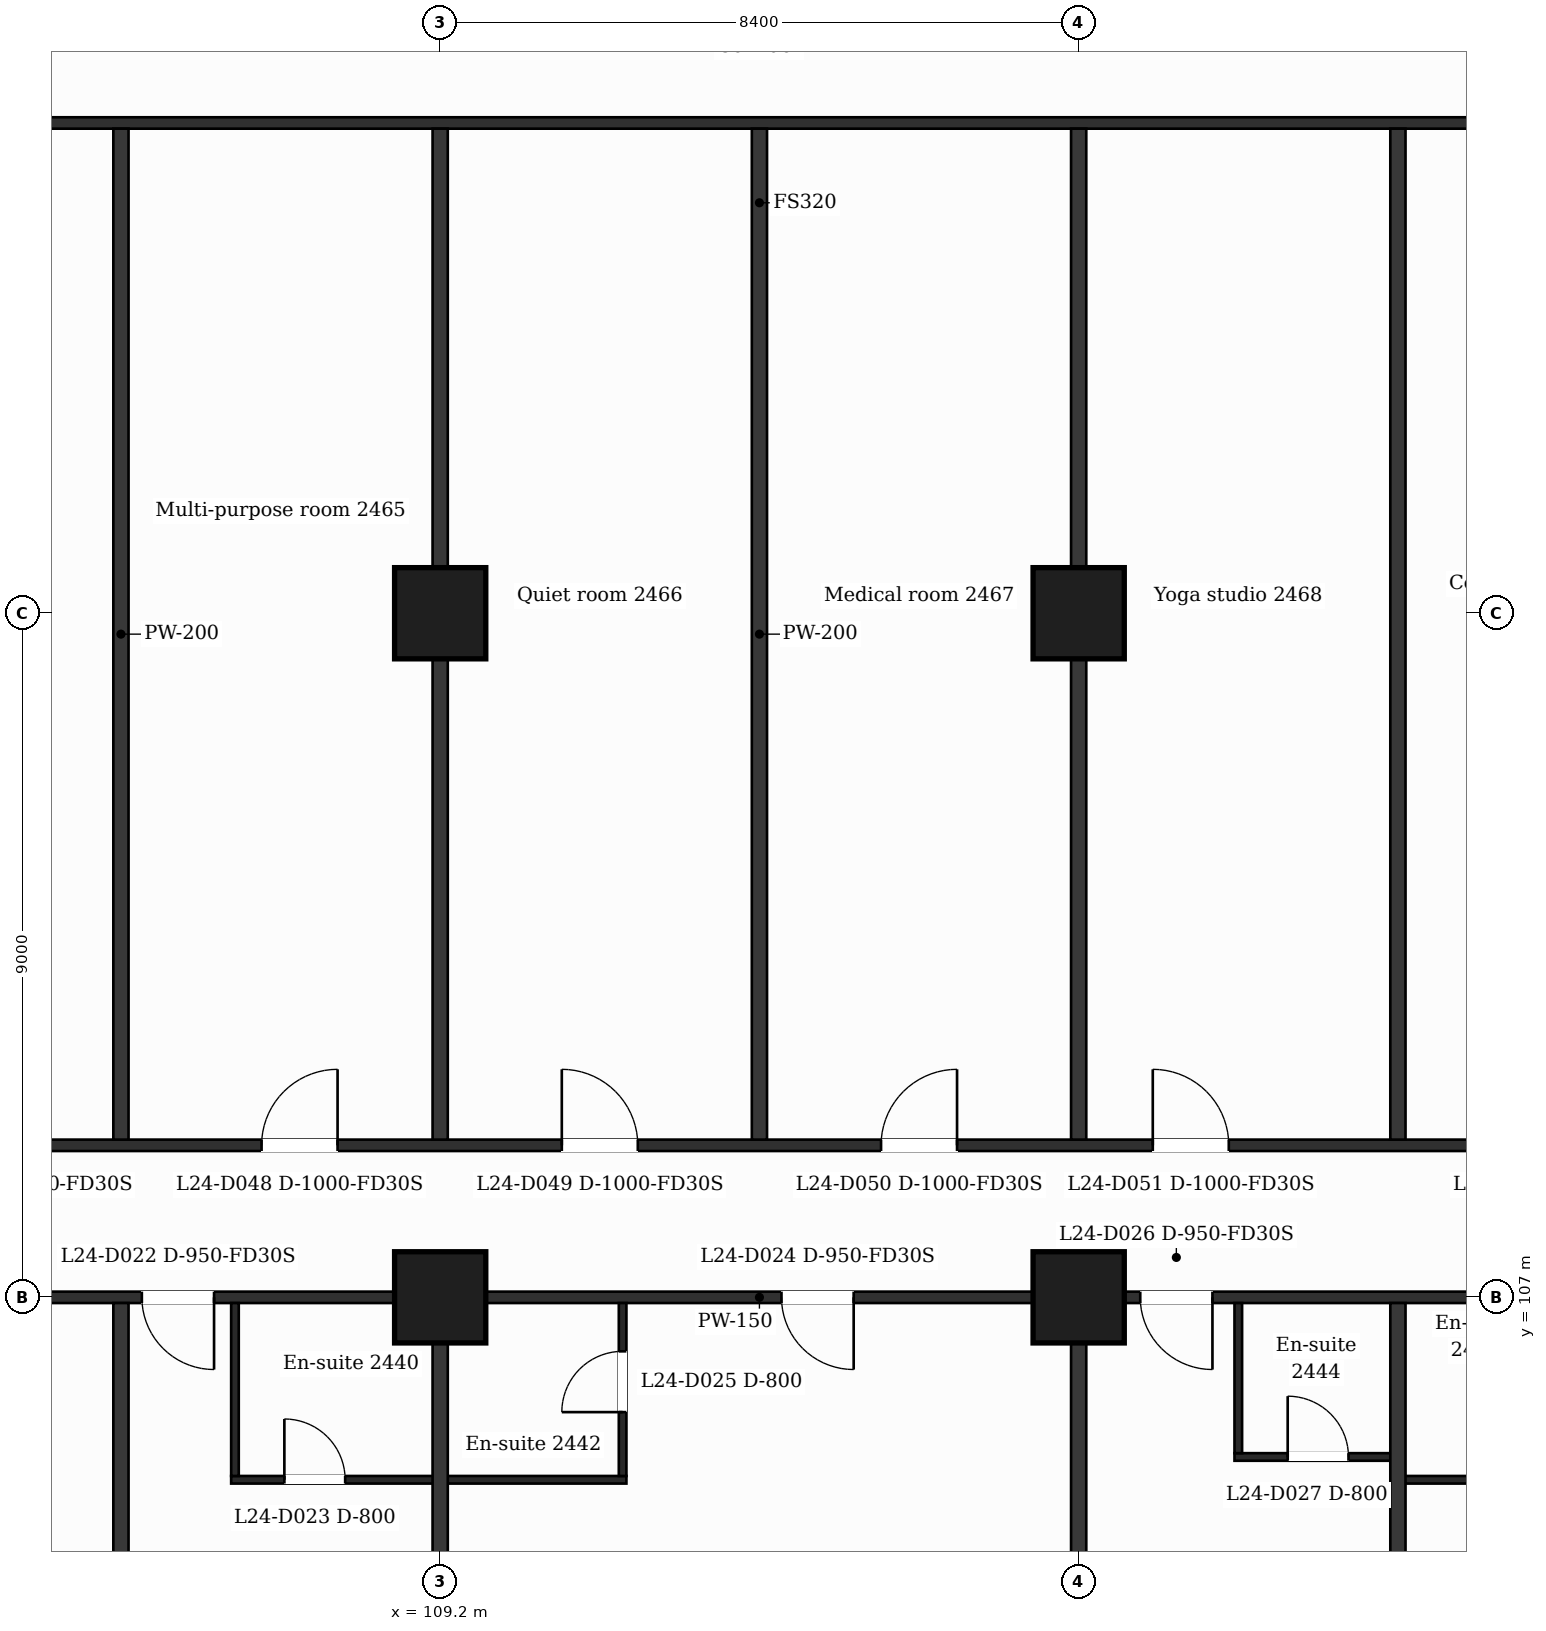
"""IFC4 building model, lengths in metres.
Left out: names, types, materials, properties, quantities, classifications, styles, units other than length and angle.
Written with IfcOpenShell. Run it as: python <this file> out.ifc"""

import sys

from ifc_helpers import new_model, si_unit, direction, frame, frame_2d, origin, origin_2d, place, context, subcontext, project, spatial, rectangle, extrude, element, fill, save


model = new_model("IFC4")
c1 = context("Model", 3, precision=1e-05, world=origin(), true_north=direction((0.0, 1.0)))
c2 = subcontext(c1, "Body", "Model", "MODEL_VIEW")
j1 = project(units=[si_unit("LENGTHUNIT", "METRE"), si_unit("PLANEANGLEUNIT", "RADIAN")], contexts=[c1])
p1 = place(None, origin())
s1 = spatial("IfcSite", under=j1, at=p1, CompositionType="ELEMENT")
p2 = place(p1, origin())
s2 = spatial("IfcBuilding", under=s1, at=p2, CompositionType="ELEMENT")
p3 = place(p2, frame((0.0, 0.0, 105.8)))
s3 = spatial("IfcBuildingStorey", under=s2, at=p3, CompositionType="ELEMENT", Elevation=105.8)
for number, where, z_axis, x_axis in (
    (1, (109.2, 107.0, 0.0), (0.0, 0.0, 1.0), (1.0, 0.0, 0.0)),
    (2, (117.6, 107.0, 0.0), (0.0, 0.0, 1.0), (1.0, 0.0, 0.0)),
    (3, (109.2, 116.0, 0.0), (0.0, 0.0, 1.0), (1.0, 0.0, 0.0)),
    (4, (117.6, 116.0, 0.0), (0.0, 0.0, 1.0), (1.0, 0.0, 0.0)),
):
    element("IfcColumn", number, at=place(p3, frame(where, z_axis=z_axis, x_axis=x_axis)), inside=s3, PredefinedType="COLUMN", context=c2, shape_type="SweptSolid", body=[
        extrude(rectangle(XDim=1.2, YDim=1.2, at=origin_2d()), origin(), (0.0, 0.0, 1.0), 3.7),
    ])
p4 = place(p3, frame((106.45, 104.6, 0.0), z_axis=(0.0, 0.0, 1.0), x_axis=(1.0, 0.0, 0.0)))
e5 = element("IfcWall", 5, at=p4, inside=s3, PredefinedType="PARTITIONING", context=c2, shape_type="SweptSolid", body=[
    extrude(rectangle(XDim=5.2, YDim=0.1, at=frame_2d((2.6, 0.0))), origin(), (0.0, 0.0, 1.0), 3.38),
])
p5 = place(p4, frame((0.7, 0.0, 0.0)))
e6 = element("IfcOpeningElement", 6, at=p5, cuts=e5, PredefinedType="OPENING", context=c2, shape_type="SweptSolid", body=[
    extrude(rectangle(XDim=0.8, YDim=2.1, at=frame_2d((0.4, 1.05))), frame((0.0, 0.06, 0.0), z_axis=(0.0, -1.0, 0.0), x_axis=(1.0, 0.0, 0.0)), (0.0, 0.0, 1.0), 0.12),
])
p6 = place(p3, frame((121.8, 104.6, 0.0), z_axis=(0.0, 0.0, 1.0), x_axis=(1.0, 0.0, 0.0)))
e7 = element("IfcWall", 7, at=p6, inside=s3, PredefinedType="PARTITIONING", context=c2, shape_type="SweptSolid", body=[
    extrude(rectangle(XDim=1.85, YDim=0.1, at=frame_2d((0.925, 0.0))), origin(), (0.0, 0.0, 1.0), 3.38),
])
p7 = place(p3, frame((119.65, 104.9, 0.0), z_axis=(0.0, 0.0, 1.0), x_axis=(1.0, 0.0, 0.0)))
e8 = element("IfcWall", 8, at=p7, inside=s3, PredefinedType="PARTITIONING", context=c2, shape_type="SweptSolid", body=[
    extrude(rectangle(XDim=2.15, YDim=0.1, at=frame_2d((1.075, 0.0))), origin(), (0.0, 0.0, 1.0), 3.38),
])
p8 = place(p7, frame((0.7, 0.0, 0.0)))
e9 = element("IfcOpeningElement", 9, at=p8, cuts=e8, PredefinedType="OPENING", context=c2, shape_type="SweptSolid", body=[
    extrude(rectangle(XDim=0.8, YDim=2.1, at=frame_2d((0.4, 1.05))), frame((0.0, 0.06, 0.0), z_axis=(0.0, -1.0, 0.0), x_axis=(1.0, 0.0, 0.0)), (0.0, 0.0, 1.0), 0.12),
])
p9 = place(p3, frame((87.018, 107.0, 0.0), z_axis=(0.0, 0.0, 1.0), x_axis=(1.0, 0.0, 0.0)))
e10 = element("IfcWall", 10, at=p9, inside=s3, PredefinedType="PARTITIONING", context=c2, shape_type="SweptSolid", body=[
    extrude(rectangle(XDim=52.765, YDim=0.15, at=frame_2d((26.382, 0.0))), origin(), (0.0, 0.0, 1.0), 3.38),
])
p10 = place(p9, frame((1.276, 0.0, 0.0)))
e11 = element("IfcOpeningElement", 11, at=p10, cuts=e10, PredefinedType="OPENING", context=c2, shape_type="SweptSolid", body=[
    extrude(rectangle(XDim=0.95, YDim=2.1, at=frame_2d((0.475, 1.05))), frame((0.0, 0.085, 0.0), z_axis=(0.0, -1.0, 0.0), x_axis=(1.0, 0.0, 0.0)), (0.0, 0.0, 1.0), 0.17),
])
p11 = place(p9, frame((6.152, 0.0, 0.0)))
e12 = element("IfcOpeningElement", 12, at=p11, cuts=e10, PredefinedType="OPENING", context=c2, shape_type="SweptSolid", body=[
    extrude(rectangle(XDim=0.95, YDim=2.1, at=frame_2d((0.475, 1.05))), frame((0.0, 0.085, 0.0), z_axis=(0.0, -1.0, 0.0), x_axis=(1.0, 0.0, 0.0)), (0.0, 0.0, 1.0), 0.17),
])
p12 = place(p9, frame((14.59, 0.0, 0.0)))
e13 = element("IfcOpeningElement", 13, at=p12, cuts=e10, PredefinedType="OPENING", context=c2, shape_type="SweptSolid", body=[
    extrude(rectangle(XDim=0.95, YDim=2.1, at=frame_2d((0.475, 1.05))), frame((0.0, 0.085, 0.0), z_axis=(0.0, -1.0, 0.0), x_axis=(1.0, 0.0, 0.0)), (0.0, 0.0, 1.0), 0.17),
])
p13 = place(p9, frame((18.257, 0.0, 0.0)))
e14 = element("IfcOpeningElement", 14, at=p13, cuts=e10, PredefinedType="OPENING", context=c2, shape_type="SweptSolid", body=[
    extrude(rectangle(XDim=0.95, YDim=2.1, at=frame_2d((0.475, 1.05))), frame((0.0, 0.085, 0.0), z_axis=(0.0, -1.0, 0.0), x_axis=(1.0, 0.0, 0.0)), (0.0, 0.0, 1.0), 0.17),
])
p14 = place(p9, frame((26.672, 0.0, 0.0)))
e15 = element("IfcOpeningElement", 15, at=p14, cuts=e10, PredefinedType="OPENING", context=c2, shape_type="SweptSolid", body=[
    extrude(rectangle(XDim=0.95, YDim=2.1, at=frame_2d((0.475, 1.05))), frame((0.0, 0.085, 0.0), z_axis=(0.0, -1.0, 0.0), x_axis=(1.0, 0.0, 0.0)), (0.0, 0.0, 1.0), 0.17),
])
p15 = place(p9, frame((31.392, 0.0, 0.0)))
e16 = element("IfcOpeningElement", 16, at=p15, cuts=e10, PredefinedType="OPENING", context=c2, shape_type="SweptSolid", body=[
    extrude(rectangle(XDim=0.95, YDim=2.1, at=frame_2d((0.475, 1.05))), frame((0.0, 0.085, 0.0), z_axis=(0.0, -1.0, 0.0), x_axis=(1.0, 0.0, 0.0)), (0.0, 0.0, 1.0), 0.17),
])
p16 = place(p9, frame((37.182, 0.0, 0.0)))
e17 = element("IfcOpeningElement", 17, at=p16, cuts=e10, PredefinedType="OPENING", context=c2, shape_type="SweptSolid", body=[
    extrude(rectangle(XDim=0.95, YDim=2.1, at=frame_2d((0.475, 1.05))), frame((0.0, 0.085, 0.0), z_axis=(0.0, -1.0, 0.0), x_axis=(1.0, 0.0, 0.0)), (0.0, 0.0, 1.0), 0.17),
])
p17 = place(p9, frame((41.762, 0.0, 0.0)))
e18 = element("IfcOpeningElement", 18, at=p17, cuts=e10, PredefinedType="OPENING", context=c2, shape_type="SweptSolid", body=[
    extrude(rectangle(XDim=0.95, YDim=2.1, at=frame_2d((0.475, 1.05))), frame((0.0, 0.085, 0.0), z_axis=(0.0, -1.0, 0.0), x_axis=(1.0, 0.0, 0.0)), (0.0, 0.0, 1.0), 0.17),
])
p18 = place(p9, frame((49.285, 0.0, 0.0)))
e19 = element("IfcOpeningElement", 19, at=p18, cuts=e10, PredefinedType="OPENING", context=c2, shape_type="SweptSolid", body=[
    extrude(rectangle(XDim=0.95, YDim=2.1, at=frame_2d((0.475, 1.05))), frame((0.0, 0.085, 0.0), z_axis=(0.0, -1.0, 0.0), x_axis=(1.0, 0.0, 0.0)), (0.0, 0.0, 1.0), 0.17),
])
p19 = place(p3, frame((100.725, 109.0, 0.0), z_axis=(0.0, 0.0, 1.0), x_axis=(1.0, 0.0, 0.0)))
e20 = element("IfcWall", 20, at=p19, inside=s3, PredefinedType="PARTITIONING", context=c2, shape_type="SweptSolid", body=[
    extrude(rectangle(XDim=25.35, YDim=0.15, at=frame_2d((12.675, 0.0))), origin(), (0.0, 0.0, 1.0), 3.38),
])
p20 = place(p19, frame((2.3, 0.0, 0.0)))
e21 = element("IfcOpeningElement", 21, at=p20, cuts=e20, PredefinedType="OPENING", context=c2, shape_type="SweptSolid", body=[
    extrude(rectangle(XDim=1.0, YDim=2.1, at=frame_2d((0.5, 1.05))), frame((0.0, 0.085, 0.0), z_axis=(0.0, -1.0, 0.0), x_axis=(1.0, 0.0, 0.0)), (0.0, 0.0, 1.0), 0.17),
])
p21 = place(p19, frame((6.125, 0.0, 0.0)))
e22 = element("IfcOpeningElement", 22, at=p21, cuts=e20, PredefinedType="OPENING", context=c2, shape_type="SweptSolid", body=[
    extrude(rectangle(XDim=1.0, YDim=2.1, at=frame_2d((0.5, 1.05))), frame((0.0, 0.085, 0.0), z_axis=(0.0, -1.0, 0.0), x_axis=(1.0, 0.0, 0.0)), (0.0, 0.0, 1.0), 0.17),
])
p22 = place(p19, frame((10.075, 0.0, 0.0)))
e23 = element("IfcOpeningElement", 23, at=p22, cuts=e20, PredefinedType="OPENING", context=c2, shape_type="SweptSolid", body=[
    extrude(rectangle(XDim=1.0, YDim=2.1, at=frame_2d((0.5, 1.05))), frame((0.0, 0.085, 0.0), z_axis=(0.0, -1.0, 0.0), x_axis=(1.0, 0.0, 0.0)), (0.0, 0.0, 1.0), 0.17),
])
p23 = place(p19, frame((14.275, 0.0, 0.0)))
e24 = element("IfcOpeningElement", 24, at=p23, cuts=e20, PredefinedType="OPENING", context=c2, shape_type="SweptSolid", body=[
    extrude(rectangle(XDim=1.0, YDim=2.1, at=frame_2d((0.5, 1.05))), frame((0.0, 0.085, 0.0), z_axis=(0.0, -1.0, 0.0), x_axis=(1.0, 0.0, 0.0)), (0.0, 0.0, 1.0), 0.17),
])
p24 = place(p19, frame((17.85, 0.0, 0.0)))
e25 = element("IfcOpeningElement", 25, at=p24, cuts=e20, PredefinedType="OPENING", context=c2, shape_type="SweptSolid", body=[
    extrude(rectangle(XDim=1.0, YDim=2.1, at=frame_2d((0.5, 1.05))), frame((0.0, 0.085, 0.0), z_axis=(0.0, -1.0, 0.0), x_axis=(1.0, 0.0, 0.0)), (0.0, 0.0, 1.0), 0.17),
])
p25 = place(p19, frame((22.925, 0.0, 0.0)))
e26 = element("IfcOpeningElement", 26, at=p25, cuts=e20, PredefinedType="OPENING", context=c2, shape_type="SweptSolid", body=[
    extrude(rectangle(XDim=1.0, YDim=2.1, at=frame_2d((0.5, 1.05))), frame((0.0, 0.085, 0.0), z_axis=(0.0, -1.0, 0.0), x_axis=(1.0, 0.0, 0.0)), (0.0, 0.0, 1.0), 0.17),
])
p26 = place(p3, frame((100.8, 122.45, 0.0), z_axis=(0.0, 0.0, 1.0), x_axis=(1.0, 0.0, 0.0)))
e27 = element("IfcWall", 27, at=p26, inside=s3, PredefinedType="PARTITIONING", context=c2, shape_type="SweptSolid", body=[
    extrude(rectangle(XDim=25.2, YDim=0.15, at=frame_2d((12.6, 0.0))), origin(), (0.0, 0.0, 1.0), 3.38),
])
p27 = place(p3, frame((105.0, 99.79, 0.0), z_axis=(0.0, 0.0, 1.0), x_axis=(0.0, 1.0, 0.0)))
e28 = element("IfcWall", 28, at=p27, inside=s3, PredefinedType="PARTITIONING", context=c2, shape_type="SweptSolid", body=[
    extrude(rectangle(XDim=7.135, YDim=0.2, at=frame_2d((3.567, 0.0))), origin(), (0.0, 0.0, 1.0), 3.38),
])
p28 = place(p3, frame((105.0, 109.075, 0.0), z_axis=(0.0, 0.0, 1.0), x_axis=(0.0, 1.0, 0.0)))
e29 = element("IfcWall", 29, at=p28, inside=s3, PredefinedType="PARTITIONING", context=c2, shape_type="SweptSolid", body=[
    extrude(rectangle(XDim=13.3, YDim=0.2, at=frame_2d((6.65, 0.0))), origin(), (0.0, 0.0, 1.0), 3.38),
])
p29 = place(p3, frame((106.5, 104.65, 0.0), z_axis=(0.0, 0.0, 1.0), x_axis=(0.0, 1.0, 0.0)))
e30 = element("IfcWall", 30, at=p29, inside=s3, PredefinedType="PARTITIONING", context=c2, shape_type="SweptSolid", body=[
    extrude(rectangle(XDim=2.275, YDim=0.1, at=frame_2d((1.138, 0.0))), origin(), (0.0, 0.0, 1.0), 3.38),
])
p30 = place(p3, frame((109.2, 99.79, 0.0), z_axis=(0.0, 0.0, 1.0), x_axis=(0.0, 1.0, 0.0)))
e31 = element("IfcWall", 31, at=p30, inside=s3, PredefinedType="PARTITIONING", context=c2, shape_type="SweptSolid", body=[
    extrude(rectangle(XDim=7.135, YDim=0.2, at=frame_2d((3.567, 0.0))), origin(), (0.0, 0.0, 1.0), 3.38),
])
p31 = place(p3, frame((109.2, 109.075, 0.0), z_axis=(0.0, 0.0, 1.0), x_axis=(0.0, 1.0, 0.0)))
e32 = element("IfcWall", 32, at=p31, inside=s3, PredefinedType="PARTITIONING", context=c2, shape_type="SweptSolid", body=[
    extrude(rectangle(XDim=13.3, YDim=0.2, at=frame_2d((6.65, 0.0))), origin(), (0.0, 0.0, 1.0), 3.38),
])
p32 = place(p3, frame((111.6, 104.65, 0.0), z_axis=(0.0, 0.0, 1.0), x_axis=(0.0, 1.0, 0.0)))
e33 = element("IfcWall", 33, at=p32, inside=s3, PredefinedType="PARTITIONING", context=c2, shape_type="SweptSolid", body=[
    extrude(rectangle(XDim=2.275, YDim=0.1, at=frame_2d((1.138, 0.0))), origin(), (0.0, 0.0, 1.0), 3.38),
])
p33 = place(p32, frame((0.84, 0.0, 0.0)))
e34 = element("IfcOpeningElement", 34, at=p33, cuts=e33, PredefinedType="OPENING", context=c2, shape_type="SweptSolid", body=[
    extrude(rectangle(XDim=0.8, YDim=2.1, at=frame_2d((0.4, 1.05))), frame((0.0, 0.06, 0.0), z_axis=(0.0, -1.0, 0.0), x_axis=(1.0, 0.0, 0.0)), (0.0, 0.0, 1.0), 0.12),
])
p34 = place(p3, frame((113.4, 109.075, 0.0), z_axis=(0.0, 0.0, 1.0), x_axis=(0.0, 1.0, 0.0)))
e35 = element("IfcWall", 35, at=p34, inside=s3, PredefinedType="PARTITIONING", context=c2, shape_type="SweptSolid", body=[
    extrude(rectangle(XDim=13.3, YDim=0.2, at=frame_2d((6.65, 0.0))), origin(), (0.0, 0.0, 1.0), 3.38),
])
p35 = place(p3, frame((117.6, 99.79, 0.0), z_axis=(0.0, 0.0, 1.0), x_axis=(0.0, 1.0, 0.0)))
e36 = element("IfcWall", 36, at=p35, inside=s3, PredefinedType="PARTITIONING", context=c2, shape_type="SweptSolid", body=[
    extrude(rectangle(XDim=7.135, YDim=0.2, at=frame_2d((3.567, 0.0))), origin(), (0.0, 0.0, 1.0), 3.38),
])
p36 = place(p3, frame((117.6, 109.075, 0.0), z_axis=(0.0, 0.0, 1.0), x_axis=(0.0, 1.0, 0.0)))
e37 = element("IfcWall", 37, at=p36, inside=s3, PredefinedType="PARTITIONING", context=c2, shape_type="SweptSolid", body=[
    extrude(rectangle(XDim=13.3, YDim=0.2, at=frame_2d((6.65, 0.0))), origin(), (0.0, 0.0, 1.0), 3.38),
])
p37 = place(p3, frame((119.7, 104.95, 0.0), z_axis=(0.0, 0.0, 1.0), x_axis=(0.0, 1.0, 0.0)))
e38 = element("IfcWall", 38, at=p37, inside=s3, PredefinedType="PARTITIONING", context=c2, shape_type="SweptSolid", body=[
    extrude(rectangle(XDim=1.975, YDim=0.1, at=frame_2d((0.988, 0.0))), origin(), (0.0, 0.0, 1.0), 3.38),
])
p38 = place(p3, frame((121.8, 99.79, 0.0), z_axis=(0.0, 0.0, 1.0), x_axis=(0.0, 1.0, 0.0)))
e39 = element("IfcWall", 39, at=p38, inside=s3, PredefinedType="PARTITIONING", context=c2, shape_type="SweptSolid", body=[
    extrude(rectangle(XDim=7.135, YDim=0.2, at=frame_2d((3.567, 0.0))), origin(), (0.0, 0.0, 1.0), 3.38),
])
p39 = place(p3, frame((121.8, 109.075, 0.0), z_axis=(0.0, 0.0, 1.0), x_axis=(0.0, 1.0, 0.0)))
e40 = element("IfcWall", 40, at=p39, inside=s3, PredefinedType="PARTITIONING", context=c2, shape_type="SweptSolid", body=[
    extrude(rectangle(XDim=13.3, YDim=0.2, at=frame_2d((6.65, 0.0))), origin(), (0.0, 0.0, 1.0), 3.38),
])
p40 = place(p13, origin())
e41 = element("IfcDoor", 41, at=p40, inside=s3, OperationType="SINGLE_SWING_RIGHT", PredefinedType="DOOR", context=c2, shape_type="SweptSolid", body=[
    extrude(rectangle(XDim=0.95, YDim=2.1, at=frame_2d((0.475, 1.05))), frame((0.0, 0.025, 0.0), z_axis=(0.0, -1.0, 0.0), x_axis=(1.0, 0.0, 0.0)), (0.0, 0.0, 1.0), 0.05),
])
fill(e14, e41)
p41 = place(p5, origin())
e42 = element("IfcDoor", 42, at=p41, inside=s3, OperationType="SINGLE_SWING_LEFT", PredefinedType="DOOR", context=c2, shape_type="SweptSolid", body=[
    extrude(rectangle(XDim=0.8, YDim=2.1, at=frame_2d((0.4, 1.05))), frame((0.0, 0.025, 0.0), z_axis=(0.0, -1.0, 0.0), x_axis=(1.0, 0.0, 0.0)), (0.0, 0.0, 1.0), 0.05),
])
fill(e6, e42)
p42 = place(p14, origin())
e43 = element("IfcDoor", 43, at=p42, inside=s3, OperationType="SINGLE_SWING_RIGHT", PredefinedType="DOOR", context=c2, shape_type="SweptSolid", body=[
    extrude(rectangle(XDim=0.95, YDim=2.1, at=frame_2d((0.475, 1.05))), frame((0.0, 0.025, 0.0), z_axis=(0.0, -1.0, 0.0), x_axis=(1.0, 0.0, 0.0)), (0.0, 0.0, 1.0), 0.05),
])
fill(e15, e43)
p43 = place(p33, origin())
e44 = element("IfcDoor", 44, at=p43, inside=s3, OperationType="SINGLE_SWING_LEFT", PredefinedType="DOOR", context=c2, shape_type="SweptSolid", body=[
    extrude(rectangle(XDim=0.8, YDim=2.1, at=frame_2d((0.4, 1.05))), frame((0.0, 0.025, 0.0), z_axis=(0.0, -1.0, 0.0), x_axis=(1.0, 0.0, 0.0)), (0.0, 0.0, 1.0), 0.05),
])
fill(e34, e44)
p44 = place(p15, origin())
e45 = element("IfcDoor", 45, at=p44, inside=s3, OperationType="SINGLE_SWING_RIGHT", PredefinedType="DOOR", context=c2, shape_type="SweptSolid", body=[
    extrude(rectangle(XDim=0.95, YDim=2.1, at=frame_2d((0.475, 1.05))), frame((0.0, 0.025, 0.0), z_axis=(0.0, -1.0, 0.0), x_axis=(1.0, 0.0, 0.0)), (0.0, 0.0, 1.0), 0.05),
])
fill(e16, e45)
p45 = place(p8, origin())
e46 = element("IfcDoor", 46, at=p45, inside=s3, OperationType="SINGLE_SWING_LEFT", PredefinedType="DOOR", context=c2, shape_type="SweptSolid", body=[
    extrude(rectangle(XDim=0.8, YDim=2.1, at=frame_2d((0.4, 1.05))), frame((0.0, 0.025, 0.0), z_axis=(0.0, -1.0, 0.0), x_axis=(1.0, 0.0, 0.0)), (0.0, 0.0, 1.0), 0.05),
])
fill(e9, e46)
p46 = place(p21, origin())
e47 = element("IfcDoor", 47, at=p46, inside=s3, OperationType="SINGLE_SWING_RIGHT", PredefinedType="DOOR", context=c2, shape_type="SweptSolid", body=[
    extrude(rectangle(XDim=1.0, YDim=2.1, at=frame_2d((0.5, 1.05))), frame((0.0, 0.025, 0.0), z_axis=(0.0, -1.0, 0.0), x_axis=(1.0, 0.0, 0.0)), (0.0, 0.0, 1.0), 0.05),
])
fill(e22, e47)
p47 = place(p22, origin())
e48 = element("IfcDoor", 48, at=p47, inside=s3, OperationType="SINGLE_SWING_LEFT", PredefinedType="DOOR", context=c2, shape_type="SweptSolid", body=[
    extrude(rectangle(XDim=1.0, YDim=2.1, at=frame_2d((0.5, 1.05))), frame((0.0, 0.025, 0.0), z_axis=(0.0, -1.0, 0.0), x_axis=(1.0, 0.0, 0.0)), (0.0, 0.0, 1.0), 0.05),
])
fill(e23, e48)
p48 = place(p23, origin())
e49 = element("IfcDoor", 49, at=p48, inside=s3, OperationType="SINGLE_SWING_RIGHT", PredefinedType="DOOR", context=c2, shape_type="SweptSolid", body=[
    extrude(rectangle(XDim=1.0, YDim=2.1, at=frame_2d((0.5, 1.05))), frame((0.0, 0.025, 0.0), z_axis=(0.0, -1.0, 0.0), x_axis=(1.0, 0.0, 0.0)), (0.0, 0.0, 1.0), 0.05),
])
fill(e24, e49)
p49 = place(p24, origin())
e50 = element("IfcDoor", 50, at=p49, inside=s3, OperationType="SINGLE_SWING_LEFT", PredefinedType="DOOR", context=c2, shape_type="SweptSolid", body=[
    extrude(rectangle(XDim=1.0, YDim=2.1, at=frame_2d((0.5, 1.05))), frame((0.0, 0.025, 0.0), z_axis=(0.0, -1.0, 0.0), x_axis=(1.0, 0.0, 0.0)), (0.0, 0.0, 1.0), 0.05),
])
fill(e25, e50)
save(model, sys.argv[1])
